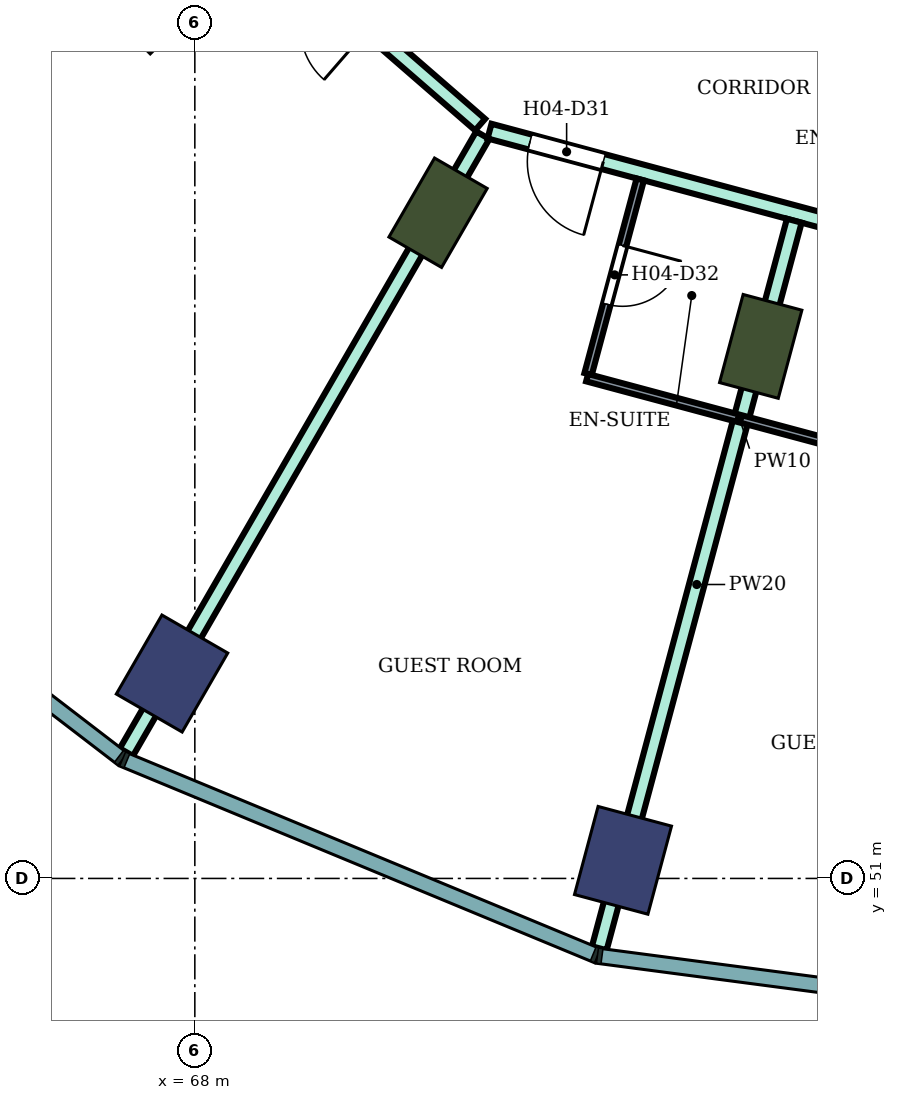
"""IFC4 building model, lengths in metres.
Left out: names, types, materials, properties, quantities, classifications, styles, units other than length and angle.
Written with IfcOpenShell. Run it as: python <this file> out.ifc"""

import sys

from ifc_helpers import new_model, si_unit, direction, frame, frame_2d, origin, origin_2d, place, context, subcontext, project, spatial, rectangle, extrude, element, fill, save


model = new_model("IFC4")
c1 = context("Model", 3, precision=1e-05, world=origin(), true_north=direction((0.0, 1.0)))
c2 = subcontext(c1, "Body", "Model", "MODEL_VIEW")
j1 = project(units=[si_unit("LENGTHUNIT", "METRE"), si_unit("PLANEANGLEUNIT", "RADIAN")], contexts=[c1])
p1 = place(None, origin())
s1 = spatial("IfcSite", under=j1, at=p1, CompositionType="ELEMENT")
p2 = place(p1, origin())
s2 = spatial("IfcBuilding", under=s1, at=p2, CompositionType="ELEMENT")
p3 = place(p2, frame((0.0, 0.0, 66.8)))
s3 = spatial("IfcBuildingStorey", under=s2, at=p3, CompositionType="ELEMENT", Elevation=66.8)
for number, where, z_axis, x_axis in (
    (1, (67.7, 53.696, 0.0), (0.0, 0.0, 1.0), (-0.5, -0.866, 0.0)),
    (2, (73.633, 51.238, 0.0), (0.0, 0.0, 1.0), (-0.259, -0.966, 0.0)),
):
    element("IfcColumn", number, at=place(p3, frame(where, z_axis=z_axis, x_axis=x_axis)), inside=s3, PredefinedType="COLUMN", context=c2, shape_type="SweptSolid", body=[
        extrude(rectangle(XDim=1.2, YDim=1.0, at=origin_2d()), origin(), (0.0, 0.0, 1.0), 3.8),
    ])
for number, where, z_axis, x_axis in (
    (3, (67.555, 62.555, 0.0), (0.0, 0.0, 1.0), (-0.707, -0.707, 0.0)),
    (4, (71.2, 59.758, 0.0), (0.0, 0.0, 1.0), (-0.5, -0.866, 0.0)),
    (5, (75.445, 58.0, 0.0), (0.0, 0.0, 1.0), (-0.259, -0.966, 0.0)),
):
    element("IfcColumn", number, at=place(p3, frame(where, z_axis=z_axis, x_axis=x_axis)), inside=s3, PredefinedType="COLUMN", context=c2, shape_type="SweptSolid", body=[
        extrude(rectangle(XDim=1.2, YDim=0.8, at=origin_2d()), origin(), (0.0, 0.0, 1.0), 3.8),
    ])
p4 = place(p3, frame((66.924, 65.111, 0.0), z_axis=(0.0, 0.0, 1.0), x_axis=(0.755023669255, -0.655697536113, 0.0)))
e6 = element("IfcWall", 6, at=p4, inside=s3, PredefinedType="PARTITIONING", context=c2, shape_type="SweptSolid", body=[
    extrude(rectangle(XDim=6.396, YDim=0.2, at=frame_2d((3.198, 0.0))), origin(), (0.0, 0.0, 1.0), 3.35),
])
p5 = place(p4, frame((2.658, 0.0, 0.0)))
e7 = element("IfcOpeningElement", 7, at=p5, cuts=e6, PredefinedType="OPENING", context=c2, shape_type="SweptSolid", body=[
    extrude(rectangle(XDim=1.8, YDim=2.1, at=frame_2d((0.9, 1.05))), frame((0.0, 0.11, 0.0), z_axis=(0.0, -1.0, 0.0), x_axis=(1.0, 0.0, 0.0)), (0.0, 0.0, 1.0), 0.22),
])
p6 = place(p3, frame((67.099, 52.661, 0.0), z_axis=(0.0, 0.0, 1.0), x_axis=(0.500234203776, 0.86589014394, 0.0)))
e8 = element("IfcWall", 8, at=p6, inside=s3, PredefinedType="PARTITIONING", context=c2, shape_type="SweptSolid", body=[
    extrude(rectangle(XDim=9.374, YDim=0.2, at=frame_2d((4.687, 0.0))), origin(), (0.0, 0.0, 1.0), 3.35),
])
p7 = place(p3, frame((71.877, 60.832, 0.0), z_axis=(0.0, 0.0, 1.0), x_axis=(0.965852509869, -0.259092510851, 0.0)))
e9 = element("IfcWall", 9, at=p7, inside=s3, PredefinedType="PARTITIONING", context=c2, shape_type="SweptSolid", body=[
    extrude(rectangle(XDim=8.32, YDim=0.2, at=frame_2d((4.16, 0.0))), origin(), (0.0, 0.0, 1.0), 3.35),
])
p8 = place(p7, frame((6.86, 0.0, 0.0)))
e10 = element("IfcOpeningElement", 10, at=p8, cuts=e9, PredefinedType="OPENING", context=c2, shape_type="SweptSolid", body=[
    extrude(rectangle(XDim=1.0, YDim=2.1, at=frame_2d((0.5, 1.05))), frame((0.0, 0.11, 0.0), z_axis=(0.0, -1.0, 0.0), x_axis=(1.0, 0.0, 0.0)), (0.0, 0.0, 1.0), 0.22),
])
p9 = place(p7, frame((0.55, 0.0, 0.0)))
e11 = element("IfcOpeningElement", 11, at=p9, cuts=e9, PredefinedType="OPENING", context=c2, shape_type="SweptSolid", body=[
    extrude(rectangle(XDim=1.0, YDim=2.1, at=frame_2d((0.5, 1.05))), frame((0.0, 0.11, 0.0), z_axis=(0.0, -1.0, 0.0), x_axis=(1.0, 0.0, 0.0)), (0.0, 0.0, 1.0), 0.22),
])
p10 = place(p3, frame((73.297, 63.143, 0.0), z_axis=(0.0, 0.0, 1.0), x_axis=(0.965859030528, -0.25906820173, 0.0)))
e12 = element("IfcWall", 12, at=p10, inside=s3, PredefinedType="PARTITIONING", context=c2, shape_type="SweptSolid", body=[
    extrude(rectangle(XDim=6.81, YDim=0.2, at=frame_2d((3.405, 0.0))), origin(), (0.0, 0.0, 1.0), 3.35),
])
p11 = place(p10, frame((5.39, 0.0, 0.0)))
e13 = element("IfcOpeningElement", 13, at=p11, cuts=e12, PredefinedType="OPENING", context=c2, shape_type="SweptSolid", body=[
    extrude(rectangle(XDim=1.0, YDim=2.1, at=frame_2d((0.5, 1.05))), frame((0.0, 0.11, 0.0), z_axis=(0.0, -1.0, 0.0), x_axis=(1.0, 0.0, 0.0)), (0.0, 0.0, 1.0), 0.22),
])
p12 = place(p3, frame((73.321, 50.081, 0.0), z_axis=(0.0, 0.0, 1.0), x_axis=(0.258889198551, 0.965907025999, 0.0)))
e14 = element("IfcWall", 14, at=p12, inside=s3, PredefinedType="PARTITIONING", context=c2, shape_type="SweptSolid", body=[
    extrude(rectangle(XDim=9.909, YDim=0.2, at=frame_2d((4.955, 0.0))), origin(), (0.0, 0.0, 1.0), 3.35),
])
p13 = place(p3, frame((73.174, 57.636, 0.0), z_axis=(0.0, 0.0, 1.0), x_axis=(0.258952498977, 0.96589005755, 0.0)))
e15 = element("IfcWall", 15, at=p13, inside=s3, PredefinedType="PARTITIONING", context=c2, shape_type="SweptSolid", body=[
    extrude(rectangle(XDim=2.65, YDim=0.1, at=frame_2d((1.325, 0.0))), origin(), (0.0, 0.0, 1.0), 3.35),
])
p14 = place(p13, frame((0.95, 0.0, 0.0)))
e16 = element("IfcOpeningElement", 16, at=p14, cuts=e15, PredefinedType="OPENING", context=c2, shape_type="SweptSolid", body=[
    extrude(rectangle(XDim=0.8, YDim=2.1, at=frame_2d((0.4, 1.05))), frame((0.0, 0.06, 0.0), z_axis=(0.0, -1.0, 0.0), x_axis=(1.0, 0.0, 0.0)), (0.0, 0.0, 1.0), 0.12),
])
p15 = place(p3, frame((73.161, 57.588, 0.0), z_axis=(0.0, 0.0, 1.0), x_axis=(0.965858994467, -0.259068336173, 0.0)))
e17 = element("IfcWall", 17, at=p15, inside=s3, PredefinedType="PARTITIONING", context=c2, shape_type="SweptSolid", body=[
    extrude(rectangle(XDim=4.15, YDim=0.1, at=frame_2d((2.075, 0.0))), origin(), (0.0, 0.0, 1.0), 3.35),
])
p16 = place(p9, frame((1.0, 0.0, 0.0), z_axis=(0.0, 0.0, 1.0), x_axis=(-1.0, 0.0, 0.0)))
e18 = element("IfcDoor", 18, at=p16, inside=s3, OperationType="SINGLE_SWING_LEFT", PredefinedType="DOOR", context=c2, shape_type="SweptSolid", body=[
    extrude(rectangle(XDim=1.0, YDim=2.1, at=frame_2d((0.5, 1.05))), frame((0.0, 0.025, 0.0), z_axis=(0.0, -1.0, 0.0), x_axis=(1.0, 0.0, 0.0)), (0.0, 0.0, 1.0), 0.05),
])
fill(e11, e18)
p17 = place(p14, frame((0.8, 0.0, 0.0), z_axis=(0.0, 0.0, 1.0), x_axis=(-1.0, 0.0, 0.0)))
e19 = element("IfcDoor", 19, at=p17, inside=s3, OperationType="SINGLE_SWING_LEFT", PredefinedType="DOOR", context=c2, shape_type="SweptSolid", body=[
    extrude(rectangle(XDim=0.8, YDim=2.1, at=frame_2d((0.4, 1.05))), frame((0.0, 0.025, 0.0), z_axis=(0.0, -1.0, 0.0), x_axis=(1.0, 0.0, 0.0)), (0.0, 0.0, 1.0), 0.05),
])
fill(e16, e19)
save(model, sys.argv[1])
